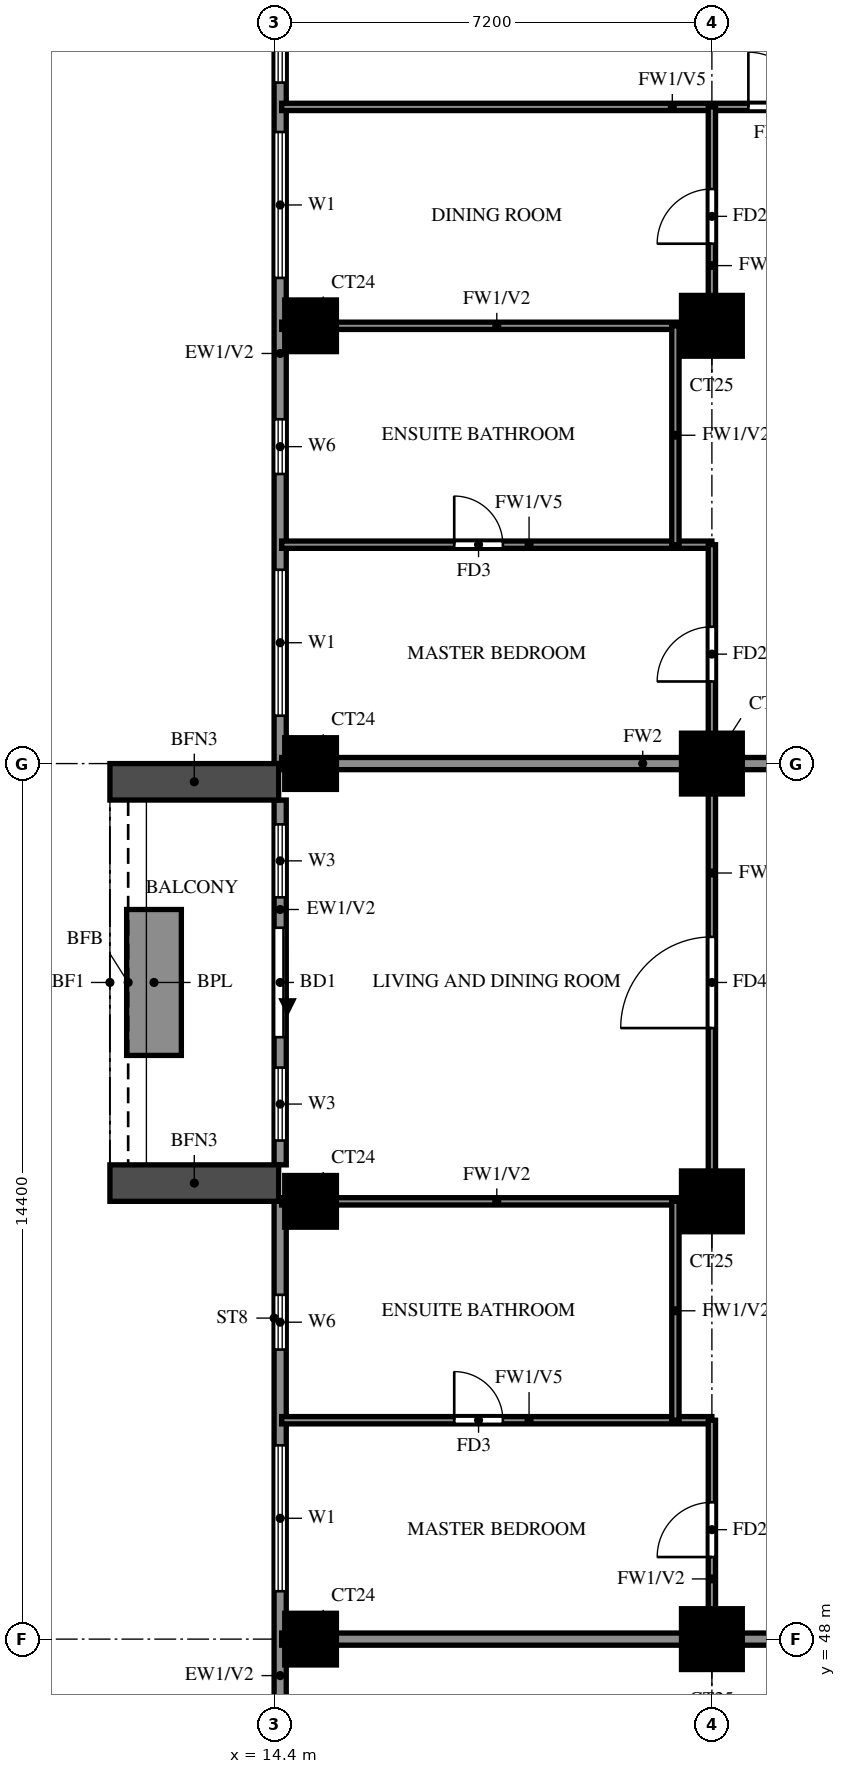
"""IFC4 building model, lengths in metres.
Left out: names, types, materials, properties, quantities, classifications, styles, units other than length and angle.
Written with IfcOpenShell. Run it as: python <this file> out.ifc"""

import sys

from ifc_helpers import new_model, si_unit, direction, frame, frame_2d, origin, origin_2d, place, context, subcontext, project, spatial, rectangle, extrude, source, transform, mapped, element, fill, save


model = new_model("IFC4")
c1 = context("Model", 3, precision=1e-05, world=origin(), true_north=direction((0.0, 1.0)))
c2 = subcontext(c1, "Body", "Model", "MODEL_VIEW")
j1 = project(units=[si_unit("LENGTHUNIT", "METRE"), si_unit("PLANEANGLEUNIT", "RADIAN")], contexts=[c1])
p1 = place(None, origin())
s1 = spatial("IfcSite", under=j1, at=p1, CompositionType="ELEMENT")
p2 = place(p1, origin())
s2 = spatial("IfcBuilding", under=s1, at=p2, CompositionType="ELEMENT")
p3 = place(p2, frame((0.0, 0.0, 164.0)))
s3 = spatial("IfcBuildingStorey", under=s2, at=p3, CompositionType="ELEMENT", Elevation=164.0)
m1 = source(origin(), c2, "Body", "SweptSolid", [
    extrude(rectangle(XDim=0.85, YDim=0.85, at=origin_2d()), origin(), (0.0, 0.0, 1.0), 3.2),
])
p4 = place(p3, frame((15.0, 48.0, 0.0), z_axis=(0.0, 0.0, 1.0), x_axis=(1.0, 0.0, 0.0)))
e1 = element("IfcColumn", 1, at=p4, inside=s3, PredefinedType="COLUMN", context=c2, shape_type="MappedRepresentation", body=[
    mapped(m1, transform((0.0, 0.0, 0.0))),
])
m2 = source(origin(), c2, "Body", "SweptSolid", [
    extrude(rectangle(XDim=1.0, YDim=1.0, at=origin_2d()), origin(), (0.0, 0.0, 1.0), 3.2),
])
p5 = place(p3, frame((21.6, 48.0, 0.0), z_axis=(0.0, 0.0, 1.0), x_axis=(1.0, 0.0, 0.0)))
e2 = element("IfcColumn", 2, at=p5, inside=s3, PredefinedType="COLUMN", context=c2, shape_type="MappedRepresentation", body=[
    mapped(m2, transform((0.0, 0.0, 0.0))),
])
p6 = place(p3, frame((15.0, 55.2, 0.0), z_axis=(0.0, 0.0, 1.0), x_axis=(1.0, 0.0, 0.0)))
e3 = element("IfcColumn", 3, at=p6, inside=s3, PredefinedType="COLUMN", context=c2, shape_type="MappedRepresentation", body=[
    mapped(m1, transform((0.0, 0.0, 0.0))),
])
p7 = place(p3, frame((21.6, 55.2, 0.0), z_axis=(0.0, 0.0, 1.0), x_axis=(1.0, 0.0, 0.0)))
e4 = element("IfcColumn", 4, at=p7, inside=s3, PredefinedType="COLUMN", context=c2, shape_type="MappedRepresentation", body=[
    mapped(m2, transform((0.0, 0.0, 0.0))),
])
p8 = place(p3, frame((15.0, 62.4, 0.0), z_axis=(0.0, 0.0, 1.0), x_axis=(1.0, 0.0, 0.0)))
e5 = element("IfcColumn", 5, at=p8, inside=s3, PredefinedType="COLUMN", context=c2, shape_type="MappedRepresentation", body=[
    mapped(m1, transform((0.0, 0.0, 0.0))),
])
p9 = place(p3, frame((21.6, 62.4, 0.0), z_axis=(0.0, 0.0, 1.0), x_axis=(1.0, 0.0, 0.0)))
e6 = element("IfcColumn", 6, at=p9, inside=s3, PredefinedType="COLUMN", context=c2, shape_type="MappedRepresentation", body=[
    mapped(m2, transform((0.0, 0.0, 0.0))),
])
p10 = place(p3, frame((15.0, 69.6, 0.0), z_axis=(0.0, 0.0, 1.0), x_axis=(1.0, 0.0, 0.0)))
e7 = element("IfcColumn", 7, at=p10, inside=s3, PredefinedType="COLUMN", context=c2, shape_type="MappedRepresentation", body=[
    mapped(m1, transform((0.0, 0.0, 0.0))),
])
p11 = place(p3, frame((21.6, 69.6, 0.0), z_axis=(0.0, 0.0, 1.0), x_axis=(1.0, 0.0, 0.0)))
e8 = element("IfcColumn", 8, at=p11, inside=s3, PredefinedType="COLUMN", context=c2, shape_type="MappedRepresentation", body=[
    mapped(m2, transform((0.0, 0.0, 0.0))),
])
p12 = place(p3, frame((14.5, 76.6, 0.0), z_axis=(0.0, 0.0, 1.0), x_axis=(0.0, -1.0, 0.0)))
e9 = element("IfcWall", 9, at=p12, inside=s3, PredefinedType="SOLIDWALL", context=c2, shape_type="SweptSolid", body=[
    extrude(rectangle(XDim=14.2, YDim=0.2, at=frame_2d((7.1, 0.0))), origin(), (0.0, 0.0, 1.0), 3.2),
])
p13 = place(p12, frame((11.012, 0.0, 0.6)))
e10 = element("IfcOpeningElement", 10, at=p13, cuts=e9, PredefinedType="OPENING", context=c2, shape_type="SweptSolid", body=[
    extrude(rectangle(XDim=2.4, YDim=2.4, at=frame_2d((1.2, 1.2))), frame((0.0, 0.11, 0.0), z_axis=(0.0, -1.0, 0.0), x_axis=(1.0, 0.0, 0.0)), (0.0, 0.0, 1.0), 0.22),
])
p14 = place(p12, frame((8.538, 0.0, 1.5)))
e11 = element("IfcOpeningElement", 11, at=p14, cuts=e9, PredefinedType="OPENING", context=c2, shape_type="SweptSolid", body=[
    extrude(rectangle(XDim=0.9, YDim=0.9, at=frame_2d((0.45, 0.45))), frame((0.0, 0.11, 0.0), z_axis=(0.0, -1.0, 0.0), x_axis=(1.0, 0.0, 0.0)), (0.0, 0.0, 1.0), 0.22),
])
p15 = place(p12, frame((3.812, 0.0, 0.6)))
e12 = element("IfcOpeningElement", 12, at=p15, cuts=e9, PredefinedType="OPENING", context=c2, shape_type="SweptSolid", body=[
    extrude(rectangle(XDim=2.4, YDim=2.4, at=frame_2d((1.2, 1.2))), frame((0.0, 0.11, 0.0), z_axis=(0.0, -1.0, 0.0), x_axis=(1.0, 0.0, 0.0)), (0.0, 0.0, 1.0), 0.22),
])
p16 = place(p12, frame((0.6, 0.0, 0.6)))
e13 = element("IfcOpeningElement", 13, at=p16, cuts=e9, PredefinedType="OPENING", context=c2, shape_type="SweptSolid", body=[
    extrude(rectangle(XDim=2.4, YDim=2.4, at=frame_2d((1.2, 1.2))), frame((0.0, 0.11, 0.0), z_axis=(0.0, -1.0, 0.0), x_axis=(1.0, 0.0, 0.0)), (0.0, 0.0, 1.0), 0.22),
])
p17 = place(p3, frame((14.5, 61.8, 0.0), z_axis=(0.0, 0.0, 1.0), x_axis=(0.0, -1.0, 0.0)))
e14 = element("IfcWall", 14, at=p17, inside=s3, PredefinedType="SOLIDWALL", context=c2, shape_type="SweptSolid", body=[
    extrude(rectangle(XDim=6.0, YDim=0.2, at=frame_2d((3.0, 0.0))), origin(), (0.0, 0.0, 1.0), 3.2),
])
p18 = place(p17, frame((2.1, 0.0, 0.0)))
e15 = element("IfcOpeningElement", 15, at=p18, cuts=e14, PredefinedType="OPENING", context=c2, shape_type="SweptSolid", body=[
    extrude(rectangle(XDim=1.8, YDim=2.4, at=frame_2d((0.9, 1.2))), frame((0.0, 0.11, 0.0), z_axis=(0.0, -1.0, 0.0), x_axis=(1.0, 0.0, 0.0)), (0.0, 0.0, 1.0), 0.22),
])
p19 = place(p17, frame((0.4, 0.0, 0.6)))
e16 = element("IfcOpeningElement", 16, at=p19, cuts=e14, PredefinedType="OPENING", context=c2, shape_type="SweptSolid", body=[
    extrude(rectangle(XDim=1.2, YDim=2.4, at=frame_2d((0.6, 1.2))), frame((0.0, 0.11, 0.0), z_axis=(0.0, -1.0, 0.0), x_axis=(1.0, 0.0, 0.0)), (0.0, 0.0, 1.0), 0.22),
])
p20 = place(p17, frame((4.4, 0.0, 0.6)))
e17 = element("IfcOpeningElement", 17, at=p20, cuts=e14, PredefinedType="OPENING", context=c2, shape_type="SweptSolid", body=[
    extrude(rectangle(XDim=1.2, YDim=2.4, at=frame_2d((0.6, 1.2))), frame((0.0, 0.11, 0.0), z_axis=(0.0, -1.0, 0.0), x_axis=(1.0, 0.0, 0.0)), (0.0, 0.0, 1.0), 0.22),
])
p21 = place(p3, frame((14.5, 55.2, 0.0), z_axis=(0.0, 0.0, 1.0), x_axis=(0.0, -1.0, 0.0)))
e18 = element("IfcWall", 18, at=p21, inside=s3, PredefinedType="SOLIDWALL", context=c2, shape_type="SweptSolid", body=[
    extrude(rectangle(XDim=12.0, YDim=0.2, at=frame_2d((6.0, 0.0))), origin(), (0.0, 0.0, 1.0), 3.2),
])
p22 = place(p21, frame((8.488, 0.0, 0.6)))
e19 = element("IfcOpeningElement", 19, at=p22, cuts=e18, PredefinedType="OPENING", context=c2, shape_type="SweptSolid", body=[
    extrude(rectangle(XDim=2.4, YDim=2.4, at=frame_2d((1.2, 1.2))), frame((0.0, 0.11, 0.0), z_axis=(0.0, -1.0, 0.0), x_axis=(1.0, 0.0, 0.0)), (0.0, 0.0, 1.0), 0.22),
])
p23 = place(p21, frame((4.012, 0.0, 0.6)))
e20 = element("IfcOpeningElement", 20, at=p23, cuts=e18, PredefinedType="OPENING", context=c2, shape_type="SweptSolid", body=[
    extrude(rectangle(XDim=2.4, YDim=2.4, at=frame_2d((1.2, 1.2))), frame((0.0, 0.11, 0.0), z_axis=(0.0, -1.0, 0.0), x_axis=(1.0, 0.0, 0.0)), (0.0, 0.0, 1.0), 0.22),
])
p24 = place(p21, frame((1.538, 0.0, 1.5)))
e21 = element("IfcOpeningElement", 21, at=p24, cuts=e18, PredefinedType="OPENING", context=c2, shape_type="SweptSolid", body=[
    extrude(rectangle(XDim=0.9, YDim=0.9, at=frame_2d((0.45, 0.45))), frame((0.0, 0.11, 0.0), z_axis=(0.0, -1.0, 0.0), x_axis=(1.0, 0.0, 0.0)), (0.0, 0.0, 1.0), 0.22),
])
for number, where, z_axis, x_axis in (
    (22, (14.475, 62.1, 0.0), (0.0, 0.0, 1.0), (-1.0, 0.0, 0.0)),
    (23, (14.475, 55.5, 0.0), (0.0, 0.0, 1.0), (-1.0, 0.0, 0.0)),
):
    element("IfcWall", number, at=place(p3, frame(where, z_axis=z_axis, x_axis=x_axis)), inside=s3, PredefinedType="SOLIDWALL", context=c2, shape_type="SweptSolid", body=[
        extrude(rectangle(XDim=2.775, YDim=0.6, at=frame_2d((1.388, 0.0))), origin(), (0.0, 0.0, 1.0), 2.85),
    ])
p25 = place(p3, frame((12.425, 60.0, 0.0), z_axis=(0.0, 0.0, 1.0), x_axis=(0.0, -1.0, 0.0)))
e24 = element("IfcWall", 24, at=p25, inside=s3, PredefinedType="SOLIDWALL", context=c2, shape_type="SweptSolid", body=[
    extrude(rectangle(XDim=2.4, YDim=0.9, at=frame_2d((1.2, 0.0))), origin(), (0.0, 0.0, 1.0), 0.9),
])
p26 = place(p3, frame((14.525, 48.0, 0.0), z_axis=(0.0, 0.0, 1.0), x_axis=(1.0, 0.0, 0.0)))
e25 = element("IfcWall", 25, at=p26, inside=s3, PredefinedType="SOLIDWALL", context=c2, shape_type="SweptSolid", body=[
    extrude(rectangle(XDim=19.075, YDim=0.2, at=frame_2d((9.538, 0.0))), origin(), (0.0, 0.0, 1.0), 3.2),
])
p27 = place(p3, frame((14.525, 62.4, 0.0), z_axis=(0.0, 0.0, 1.0), x_axis=(1.0, 0.0, 0.0)))
e26 = element("IfcWall", 26, at=p27, inside=s3, PredefinedType="SOLIDWALL", context=c2, shape_type="SweptSolid", body=[
    extrude(rectangle(XDim=11.875, YDim=0.2, at=frame_2d((5.938, 0.0))), origin(), (0.0, 0.0, 1.0), 3.2),
])
p28 = place(p3, frame((14.525, 51.6, 0.0), z_axis=(0.0, 0.0, 1.0), x_axis=(1.0, 0.0, 0.0)))
e27 = element("IfcWall", 27, at=p28, inside=s3, PredefinedType="PARTITIONING", context=c2, shape_type="SweptSolid", body=[
    extrude(rectangle(XDim=7.075, YDim=0.12, at=frame_2d((3.538, 0.0))), origin(), (0.0, 0.0, 1.0), 2.3),
])
p29 = place(p28, frame((2.837, 0.0, 0.0)))
e28 = element("IfcOpeningElement", 28, at=p29, cuts=e27, PredefinedType="OPENING", context=c2, shape_type="SweptSolid", body=[
    extrude(rectangle(XDim=0.8, YDim=2.1, at=frame_2d((0.4, 1.05))), frame((0.0, 0.07, 0.0), z_axis=(0.0, -1.0, 0.0), x_axis=(1.0, 0.0, 0.0)), (0.0, 0.0, 1.0), 0.14),
])
p30 = place(p3, frame((14.525, 55.2, 0.0), z_axis=(0.0, 0.0, 1.0), x_axis=(1.0, 0.0, 0.0)))
e29 = element("IfcWall", 29, at=p30, inside=s3, PredefinedType="PARTITIONING", context=c2, shape_type="SweptSolid", body=[
    extrude(rectangle(XDim=7.075, YDim=0.12, at=frame_2d((3.538, 0.0))), origin(), (0.0, 0.0, 1.0), 3.2),
])
p31 = place(p3, frame((14.525, 66.0, 0.0), z_axis=(0.0, 0.0, 1.0), x_axis=(1.0, 0.0, 0.0)))
e30 = element("IfcWall", 30, at=p31, inside=s3, PredefinedType="PARTITIONING", context=c2, shape_type="SweptSolid", body=[
    extrude(rectangle(XDim=7.075, YDim=0.12, at=frame_2d((3.538, 0.0))), origin(), (0.0, 0.0, 1.0), 2.3),
])
p32 = place(p31, frame((2.837, 0.0, 0.0)))
e31 = element("IfcOpeningElement", 31, at=p32, cuts=e30, PredefinedType="OPENING", context=c2, shape_type="SweptSolid", body=[
    extrude(rectangle(XDim=0.8, YDim=2.1, at=frame_2d((0.4, 1.05))), frame((0.0, 0.07, 0.0), z_axis=(0.0, -1.0, 0.0), x_axis=(1.0, 0.0, 0.0)), (0.0, 0.0, 1.0), 0.14),
])
p33 = place(p3, frame((14.525, 69.6, 0.0), z_axis=(0.0, 0.0, 1.0), x_axis=(1.0, 0.0, 0.0)))
e32 = element("IfcWall", 32, at=p33, inside=s3, PredefinedType="PARTITIONING", context=c2, shape_type="SweptSolid", body=[
    extrude(rectangle(XDim=7.075, YDim=0.12, at=frame_2d((3.538, 0.0))), origin(), (0.0, 0.0, 1.0), 3.2),
])
p34 = place(p3, frame((14.525, 73.2, 0.0), z_axis=(0.0, 0.0, 1.0), x_axis=(1.0, 0.0, 0.0)))
e33 = element("IfcWall", 33, at=p34, inside=s3, PredefinedType="PARTITIONING", context=c2, shape_type="SweptSolid", body=[
    extrude(rectangle(XDim=14.275, YDim=0.12, at=frame_2d((7.138, 0.0))), origin(), (0.0, 0.0, 1.0), 2.3),
])
p35 = place(p34, frame((7.675, 0.0, 0.0)))
e34 = element("IfcOpeningElement", 34, at=p35, cuts=e33, PredefinedType="OPENING", context=c2, shape_type="SweptSolid", body=[
    extrude(rectangle(XDim=0.9, YDim=2.1, at=frame_2d((0.45, 1.05))), frame((0.0, 0.07, 0.0), z_axis=(0.0, -1.0, 0.0), x_axis=(1.0, 0.0, 0.0)), (0.0, 0.0, 1.0), 0.14),
])
p36 = place(p3, frame((21.0, 51.6, 0.0), z_axis=(0.0, 0.0, 1.0), x_axis=(0.0, 1.0, 0.0)))
e35 = element("IfcWall", 35, at=p36, inside=s3, PredefinedType="PARTITIONING", context=c2, shape_type="SweptSolid", body=[
    extrude(rectangle(XDim=3.6, YDim=0.12, at=frame_2d((1.8, 0.0))), origin(), (0.0, 0.0, 1.0), 3.2),
])
p37 = place(p3, frame((21.0, 66.0, 0.0), z_axis=(0.0, 0.0, 1.0), x_axis=(0.0, 1.0, 0.0)))
e36 = element("IfcWall", 36, at=p37, inside=s3, PredefinedType="PARTITIONING", context=c2, shape_type="SweptSolid", body=[
    extrude(rectangle(XDim=3.6, YDim=0.12, at=frame_2d((1.8, 0.0))), origin(), (0.0, 0.0, 1.0), 3.2),
])
p38 = place(p3, frame((21.6, 48.0, 0.0), z_axis=(0.0, 0.0, 1.0), x_axis=(0.0, 1.0, 0.0)))
e37 = element("IfcWall", 37, at=p38, inside=s3, PredefinedType="PARTITIONING", context=c2, shape_type="SweptSolid", body=[
    extrude(rectangle(XDim=3.6, YDim=0.12, at=frame_2d((1.8, 0.0))), origin(), (0.0, 0.0, 1.0), 3.2),
])
p39 = place(p38, frame((1.35, 0.0, 0.0)))
e38 = element("IfcOpeningElement", 38, at=p39, cuts=e37, PredefinedType="OPENING", context=c2, shape_type="SweptSolid", body=[
    extrude(rectangle(XDim=0.9, YDim=2.1, at=frame_2d((0.45, 1.05))), frame((0.0, 0.07, 0.0), z_axis=(0.0, -1.0, 0.0), x_axis=(1.0, 0.0, 0.0)), (0.0, 0.0, 1.0), 0.14),
])
p40 = place(p3, frame((21.6, 55.2, 0.0), z_axis=(0.0, 0.0, 1.0), x_axis=(0.0, 1.0, 0.0)))
e39 = element("IfcWall", 39, at=p40, inside=s3, PredefinedType="PARTITIONING", context=c2, shape_type="SweptSolid", body=[
    extrude(rectangle(XDim=10.8, YDim=0.12, at=frame_2d((5.4, 0.0))), origin(), (0.0, 0.0, 1.0), 3.2),
])
p41 = place(p40, frame((2.85, 0.0, 0.0)))
e40 = element("IfcOpeningElement", 40, at=p41, cuts=e39, PredefinedType="OPENING", context=c2, shape_type="SweptSolid", body=[
    extrude(rectangle(XDim=1.5, YDim=2.1, at=frame_2d((0.75, 1.05))), frame((0.0, 0.07, 0.0), z_axis=(0.0, -1.0, 0.0), x_axis=(1.0, 0.0, 0.0)), (0.0, 0.0, 1.0), 0.14),
])
p42 = place(p40, frame((8.55, 0.0, 0.0)))
e41 = element("IfcOpeningElement", 41, at=p42, cuts=e39, PredefinedType="OPENING", context=c2, shape_type="SweptSolid", body=[
    extrude(rectangle(XDim=0.9, YDim=2.1, at=frame_2d((0.45, 1.05))), frame((0.0, 0.07, 0.0), z_axis=(0.0, -1.0, 0.0), x_axis=(1.0, 0.0, 0.0)), (0.0, 0.0, 1.0), 0.14),
])
p43 = place(p3, frame((21.6, 69.6, 0.0), z_axis=(0.0, 0.0, 1.0), x_axis=(0.0, 1.0, 0.0)))
e42 = element("IfcWall", 42, at=p43, inside=s3, PredefinedType="PARTITIONING", context=c2, shape_type="SweptSolid", body=[
    extrude(rectangle(XDim=3.6, YDim=0.12, at=frame_2d((1.8, 0.0))), origin(), (0.0, 0.0, 1.0), 3.2),
])
p44 = place(p43, frame((1.35, 0.0, 0.0)))
e43 = element("IfcOpeningElement", 43, at=p44, cuts=e42, PredefinedType="OPENING", context=c2, shape_type="SweptSolid", body=[
    extrude(rectangle(XDim=0.9, YDim=2.1, at=frame_2d((0.45, 1.05))), frame((0.0, 0.07, 0.0), z_axis=(0.0, -1.0, 0.0), x_axis=(1.0, 0.0, 0.0)), (0.0, 0.0, 1.0), 0.14),
])
p45 = place(p13, origin())
e44 = element("IfcWindow", 44, at=p45, inside=s3, PartitioningType="DOUBLE_PANEL_VERTICAL", PredefinedType="WINDOW", context=c2, shape_type="SweptSolid", body=[
    extrude(rectangle(XDim=2.4, YDim=2.4, at=frame_2d((1.2, 1.2))), frame((0.0, 0.03, 0.0), z_axis=(0.0, -1.0, 0.0), x_axis=(1.0, 0.0, 0.0)), (0.0, 0.0, 1.0), 0.06),
])
fill(e10, e44)
p46 = place(p14, origin())
e45 = element("IfcWindow", 45, at=p46, inside=s3, PartitioningType="SINGLE_PANEL", PredefinedType="WINDOW", context=c2, shape_type="SweptSolid", body=[
    extrude(rectangle(XDim=0.9, YDim=0.9, at=frame_2d((0.45, 0.45))), frame((0.0, 0.03, 0.0), z_axis=(0.0, -1.0, 0.0), x_axis=(1.0, 0.0, 0.0)), (0.0, 0.0, 1.0), 0.06),
])
fill(e11, e45)
p47 = place(p15, origin())
e46 = element("IfcWindow", 46, at=p47, inside=s3, PartitioningType="DOUBLE_PANEL_VERTICAL", PredefinedType="WINDOW", context=c2, shape_type="SweptSolid", body=[
    extrude(rectangle(XDim=2.4, YDim=2.4, at=frame_2d((1.2, 1.2))), frame((0.0, 0.03, 0.0), z_axis=(0.0, -1.0, 0.0), x_axis=(1.0, 0.0, 0.0)), (0.0, 0.0, 1.0), 0.06),
])
fill(e12, e46)
p48 = place(p16, origin())
e47 = element("IfcWindow", 47, at=p48, inside=s3, PartitioningType="DOUBLE_PANEL_VERTICAL", PredefinedType="WINDOW", context=c2, shape_type="SweptSolid", body=[
    extrude(rectangle(XDim=2.4, YDim=2.4, at=frame_2d((1.2, 1.2))), frame((0.0, 0.03, 0.0), z_axis=(0.0, -1.0, 0.0), x_axis=(1.0, 0.0, 0.0)), (0.0, 0.0, 1.0), 0.06),
])
fill(e13, e47)
p49 = place(p18, origin())
e48 = element("IfcDoor", 48, at=p49, inside=s3, OperationType="DOUBLE_DOOR_SLIDING", PredefinedType="DOOR", context=c2, shape_type="SweptSolid", body=[
    extrude(rectangle(XDim=1.8, YDim=2.4, at=frame_2d((0.9, 1.2))), frame((0.0, 0.025, 0.0), z_axis=(0.0, -1.0, 0.0), x_axis=(1.0, 0.0, 0.0)), (0.0, 0.0, 1.0), 0.05),
])
fill(e15, e48)
p50 = place(p19, origin())
e49 = element("IfcWindow", 49, at=p50, inside=s3, PartitioningType="SINGLE_PANEL", PredefinedType="WINDOW", context=c2, shape_type="SweptSolid", body=[
    extrude(rectangle(XDim=1.2, YDim=2.4, at=frame_2d((0.6, 1.2))), frame((0.0, 0.03, 0.0), z_axis=(0.0, -1.0, 0.0), x_axis=(1.0, 0.0, 0.0)), (0.0, 0.0, 1.0), 0.06),
])
fill(e16, e49)
p51 = place(p20, origin())
e50 = element("IfcWindow", 50, at=p51, inside=s3, PartitioningType="SINGLE_PANEL", PredefinedType="WINDOW", context=c2, shape_type="SweptSolid", body=[
    extrude(rectangle(XDim=1.2, YDim=2.4, at=frame_2d((0.6, 1.2))), frame((0.0, 0.03, 0.0), z_axis=(0.0, -1.0, 0.0), x_axis=(1.0, 0.0, 0.0)), (0.0, 0.0, 1.0), 0.06),
])
fill(e17, e50)
p52 = place(p23, origin())
e51 = element("IfcWindow", 51, at=p52, inside=s3, PartitioningType="DOUBLE_PANEL_VERTICAL", PredefinedType="WINDOW", context=c2, shape_type="SweptSolid", body=[
    extrude(rectangle(XDim=2.4, YDim=2.4, at=frame_2d((1.2, 1.2))), frame((0.0, 0.03, 0.0), z_axis=(0.0, -1.0, 0.0), x_axis=(1.0, 0.0, 0.0)), (0.0, 0.0, 1.0), 0.06),
])
fill(e20, e51)
p53 = place(p24, origin())
e52 = element("IfcWindow", 52, at=p53, inside=s3, PartitioningType="SINGLE_PANEL", PredefinedType="WINDOW", context=c2, shape_type="SweptSolid", body=[
    extrude(rectangle(XDim=0.9, YDim=0.9, at=frame_2d((0.45, 0.45))), frame((0.0, 0.03, 0.0), z_axis=(0.0, -1.0, 0.0), x_axis=(1.0, 0.0, 0.0)), (0.0, 0.0, 1.0), 0.06),
])
fill(e21, e52)
p54 = place(p39, origin())
e53 = element("IfcDoor", 53, at=p54, inside=s3, OperationType="SINGLE_SWING_RIGHT", PredefinedType="DOOR", context=c2, shape_type="SweptSolid", body=[
    extrude(rectangle(XDim=0.9, YDim=2.1, at=frame_2d((0.45, 1.05))), frame((0.0, 0.025, 0.0), z_axis=(0.0, -1.0, 0.0), x_axis=(1.0, 0.0, 0.0)), (0.0, 0.0, 1.0), 0.05),
])
fill(e38, e53)
p55 = place(p29, origin())
e54 = element("IfcDoor", 54, at=p55, inside=s3, OperationType="SINGLE_SWING_LEFT", PredefinedType="DOOR", context=c2, shape_type="SweptSolid", body=[
    extrude(rectangle(XDim=0.8, YDim=2.1, at=frame_2d((0.4, 1.05))), frame((0.0, 0.025, 0.0), z_axis=(0.0, -1.0, 0.0), x_axis=(1.0, 0.0, 0.0)), (0.0, 0.0, 1.0), 0.05),
])
fill(e28, e54)
p56 = place(p41, origin())
e55 = element("IfcDoor", 55, at=p56, inside=s3, OperationType="SINGLE_SWING_LEFT", PredefinedType="DOOR", context=c2, shape_type="SweptSolid", body=[
    extrude(rectangle(XDim=1.5, YDim=2.1, at=frame_2d((0.75, 1.05))), frame((0.0, 0.025, 0.0), z_axis=(0.0, -1.0, 0.0), x_axis=(1.0, 0.0, 0.0)), (0.0, 0.0, 1.0), 0.05),
])
fill(e40, e55)
p57 = place(p42, origin())
e56 = element("IfcDoor", 56, at=p57, inside=s3, OperationType="SINGLE_SWING_RIGHT", PredefinedType="DOOR", context=c2, shape_type="SweptSolid", body=[
    extrude(rectangle(XDim=0.9, YDim=2.1, at=frame_2d((0.45, 1.05))), frame((0.0, 0.025, 0.0), z_axis=(0.0, -1.0, 0.0), x_axis=(1.0, 0.0, 0.0)), (0.0, 0.0, 1.0), 0.05),
])
fill(e41, e56)
p58 = place(p32, origin())
e57 = element("IfcDoor", 57, at=p58, inside=s3, OperationType="SINGLE_SWING_LEFT", PredefinedType="DOOR", context=c2, shape_type="SweptSolid", body=[
    extrude(rectangle(XDim=0.8, YDim=2.1, at=frame_2d((0.4, 1.05))), frame((0.0, 0.025, 0.0), z_axis=(0.0, -1.0, 0.0), x_axis=(1.0, 0.0, 0.0)), (0.0, 0.0, 1.0), 0.05),
])
fill(e31, e57)
p59 = place(p44, origin())
e58 = element("IfcDoor", 58, at=p59, inside=s3, OperationType="SINGLE_SWING_LEFT", PredefinedType="DOOR", context=c2, shape_type="SweptSolid", body=[
    extrude(rectangle(XDim=0.9, YDim=2.1, at=frame_2d((0.45, 1.05))), frame((0.0, 0.025, 0.0), z_axis=(0.0, -1.0, 0.0), x_axis=(1.0, 0.0, 0.0)), (0.0, 0.0, 1.0), 0.05),
])
fill(e43, e58)
p60 = place(p35, origin())
e59 = element("IfcDoor", 59, at=p60, inside=s3, OperationType="SINGLE_SWING_RIGHT", PredefinedType="DOOR", context=c2, shape_type="SweptSolid", body=[
    extrude(rectangle(XDim=0.9, YDim=2.1, at=frame_2d((0.45, 1.05))), frame((0.0, 0.025, 0.0), z_axis=(0.0, -1.0, 0.0), x_axis=(1.0, 0.0, 0.0)), (0.0, 0.0, 1.0), 0.05),
])
fill(e34, e59)
save(model, sys.argv[1])
